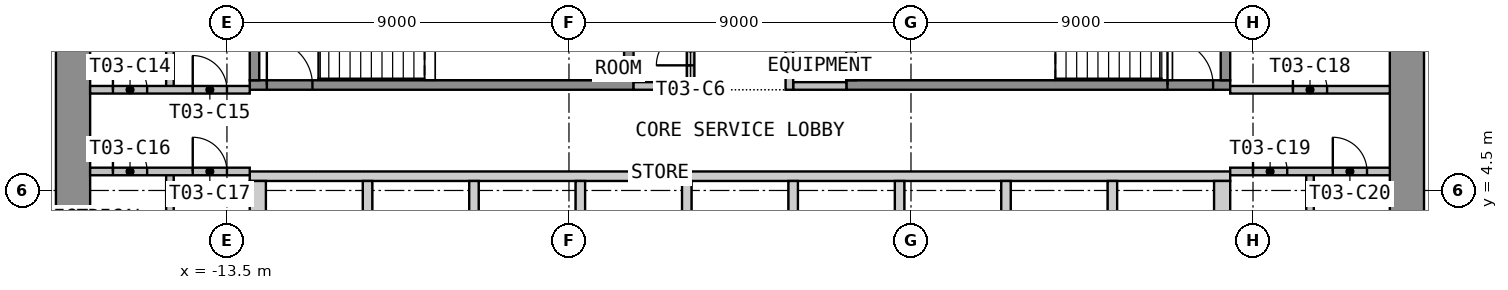
"""IFC4 building model, lengths in metres.
Left out: names, types, materials, properties, quantities, classifications, styles, units other than length and angle.
Written with IfcOpenShell. Run it as: python <this file> out.ifc"""

import sys

from ifc_helpers import new_model, si_unit, direction, frame, frame_2d, origin, place, context, subcontext, project, spatial, polyline, rectangle, outline, extrude, element, fill, save


model = new_model("IFC4")
c1 = context("Model", 3, precision=1e-05, world=origin(), true_north=direction((0.0, 1.0)))
c2 = subcontext(c1, "Body", "Model", "MODEL_VIEW")
j1 = project(units=[si_unit("LENGTHUNIT", "METRE"), si_unit("PLANEANGLEUNIT", "RADIAN")], contexts=[c1])
p1 = place(None, origin())
s1 = spatial("IfcSite", under=j1, at=p1, CompositionType="ELEMENT")
p2 = place(p1, origin())
s2 = spatial("IfcBuilding", under=s1, at=p2, CompositionType="ELEMENT")
p3 = place(p2, frame((0.0, 0.0, 53.4)))
s3 = spatial("IfcBuildingStorey", under=s2, at=p3, CompositionType="ELEMENT", Elevation=53.4)
p4 = place(p3, frame((-17.55, -12.6, 0.0), z_axis=(0.0, 0.0, 1.0), x_axis=(0.0, 1.0, 0.0)))
e1 = element("IfcWall", 1, at=p4, inside=s3, PredefinedType="SHEAR", context=c2, shape_type="SweptSolid", body=[
    extrude(rectangle(XDim=25.2, YDim=0.9, at=frame_2d((12.6, 0.0))), origin(), (0.0, 0.0, 1.0), 3.525),
])
p5 = place(p4, frame((11.4, 0.0, 0.0)))
e2 = element("IfcOpeningElement", 2, at=p5, cuts=e1, PredefinedType="OPENING", context=c2, shape_type="SweptSolid", body=[
    extrude(rectangle(XDim=2.4, YDim=2.1, at=frame_2d((1.2, 1.05))), frame((0.0, 0.46, 0.0), z_axis=(0.0, -1.0, 0.0), x_axis=(1.0, 0.0, 0.0)), (0.0, 0.0, 1.0), 0.92),
])
p6 = place(p3, frame((17.55, -12.6, 0.0), z_axis=(0.0, 0.0, 1.0), x_axis=(0.0, 1.0, 0.0)))
e3 = element("IfcWall", 3, at=p6, inside=s3, PredefinedType="SHEAR", context=c2, shape_type="SweptSolid", body=[
    extrude(rectangle(XDim=25.2, YDim=0.9, at=frame_2d((12.6, 0.0))), origin(), (0.0, 0.0, 1.0), 3.525),
])
p7 = place(p6, frame((11.4, 0.0, 0.0)))
e4 = element("IfcOpeningElement", 4, at=p7, cuts=e3, PredefinedType="OPENING", context=c2, shape_type="SweptSolid", body=[
    extrude(rectangle(XDim=2.4, YDim=2.1, at=frame_2d((1.2, 1.05))), frame((0.0, 0.46, 0.0), z_axis=(0.0, -1.0, 0.0), x_axis=(1.0, 0.0, 0.0)), (0.0, 0.0, 1.0), 0.92),
])
p8 = place(p3, origin())
e5 = element("IfcWall", 5, at=p8, inside=s3, PredefinedType="SHEAR", context=c2, shape_type="SweptSolid", body=[
    extrude(outline(polyline([(-12.9, 4.75), (12.9, 4.75), (12.9, 5.0), (-12.9, 5.0), (-12.9, 4.75)])), origin(), (0.0, 0.0, 1.0), 3.525),
])
p9 = place(p3, origin())
e6 = element("IfcWall", 6, at=p9, inside=s3, PredefinedType="SHEAR", context=c2, shape_type="SweptSolid", body=[
    extrude(outline(polyline([(-12.9, 2.05), (-12.475, 2.05), (-12.475, 4.75), (-12.9, 4.75), (-12.9, 2.05)])), origin(), (0.0, 0.0, 1.0), 3.525),
])
p10 = place(p3, origin())
e7 = element("IfcWall", 7, at=p10, inside=s3, PredefinedType="SHEAR", context=c2, shape_type="SweptSolid", body=[
    extrude(outline(polyline([(-9.925, 2.05), (-9.675, 2.05), (-9.675, 4.75), (-9.925, 4.75), (-9.925, 2.05)])), origin(), (0.0, 0.0, 1.0), 3.525),
])
p11 = place(p3, origin())
e8 = element("IfcWall", 8, at=p11, inside=s3, PredefinedType="SHEAR", context=c2, shape_type="SweptSolid", body=[
    extrude(outline(polyline([(-7.125, 2.05), (-6.875, 2.05), (-6.875, 4.75), (-7.125, 4.75), (-7.125, 2.05)])), origin(), (0.0, 0.0, 1.0), 3.525),
])
p12 = place(p3, origin())
e9 = element("IfcWall", 9, at=p12, inside=s3, PredefinedType="SHEAR", context=c2, shape_type="SweptSolid", body=[
    extrude(outline(polyline([(-4.325, 2.05), (-4.075, 2.05), (-4.075, 4.75), (-4.325, 4.75), (-4.325, 2.05)])), origin(), (0.0, 0.0, 1.0), 3.525),
])
p13 = place(p3, origin())
e10 = element("IfcWall", 10, at=p13, inside=s3, PredefinedType="SHEAR", context=c2, shape_type="SweptSolid", body=[
    extrude(outline(polyline([(-1.525, 2.05), (-1.275, 2.05), (-1.275, 4.75), (-1.525, 4.75), (-1.525, 2.05)])), origin(), (0.0, 0.0, 1.0), 3.525),
])
p14 = place(p3, origin())
e11 = element("IfcWall", 11, at=p14, inside=s3, PredefinedType="SHEAR", context=c2, shape_type="SweptSolid", body=[
    extrude(outline(polyline([(1.275, 2.05), (1.525, 2.05), (1.525, 4.75), (1.275, 4.75), (1.275, 2.05)])), origin(), (0.0, 0.0, 1.0), 3.525),
])
p15 = place(p3, origin())
e12 = element("IfcWall", 12, at=p15, inside=s3, PredefinedType="SHEAR", context=c2, shape_type="SweptSolid", body=[
    extrude(outline(polyline([(4.075, 2.05), (4.325, 2.05), (4.325, 4.75), (4.075, 4.75), (4.075, 2.05)])), origin(), (0.0, 0.0, 1.0), 3.525),
])
p16 = place(p3, origin())
e13 = element("IfcWall", 13, at=p16, inside=s3, PredefinedType="SHEAR", context=c2, shape_type="SweptSolid", body=[
    extrude(outline(polyline([(6.875, 2.05), (7.125, 2.05), (7.125, 4.75), (6.875, 4.75), (6.875, 2.05)])), origin(), (0.0, 0.0, 1.0), 3.525),
])
p17 = place(p3, origin())
e14 = element("IfcWall", 14, at=p17, inside=s3, PredefinedType="SHEAR", context=c2, shape_type="SweptSolid", body=[
    extrude(outline(polyline([(9.675, 2.05), (9.925, 2.05), (9.925, 4.75), (9.675, 4.75), (9.675, 2.05)])), origin(), (0.0, 0.0, 1.0), 3.525),
])
p18 = place(p3, origin())
e15 = element("IfcWall", 15, at=p18, inside=s3, PredefinedType="SHEAR", context=c2, shape_type="SweptSolid", body=[
    extrude(outline(polyline([(12.475, 2.05), (12.9, 2.05), (12.9, 4.75), (12.475, 4.75), (12.475, 2.05)])), origin(), (0.0, 0.0, 1.0), 3.525),
])
p19 = place(p3, frame((-12.9, 7.275, 0.0), z_axis=(0.0, 0.0, 1.0), x_axis=(1.0, 0.0, 0.0)))
e16 = element("IfcWall", 16, at=p19, inside=s3, PredefinedType="SHEAR", context=c2, shape_type="SweptSolid", body=[
    extrude(rectangle(XDim=10.1, YDim=0.25, at=frame_2d((5.05, 0.0))), origin(), (0.0, 0.0, 1.0), 3.525),
])
p20 = place(p19, frame((0.45, 0.0, 0.0)))
e17 = element("IfcOpeningElement", 17, at=p20, cuts=e16, PredefinedType="OPENING", context=c2, shape_type="SweptSolid", body=[
    extrude(rectangle(XDim=1.2, YDim=2.1, at=frame_2d((0.6, 1.05))), frame((0.0, 0.135, 0.0), z_axis=(0.0, -1.0, 0.0), x_axis=(1.0, 0.0, 0.0)), (0.0, 0.0, 1.0), 0.27),
])
for number, where, z_axis, x_axis in (
    (18, (-12.775, 7.4, 0.0), (0.0, 0.0, 1.0), (0.0, 1.0, 0.0)),
    (19, (-2.925, 7.4, 0.0), (0.0, 0.0, 1.0), (0.0, 1.0, 0.0)),
):
    element("IfcWall", number, at=place(p3, frame(where, z_axis=z_axis, x_axis=x_axis)), inside=s3, PredefinedType="SHEAR", context=c2, shape_type="SweptSolid", body=[
        extrude(rectangle(XDim=3.25, YDim=0.25, at=frame_2d((1.625, 0.0))), origin(), (0.0, 0.0, 1.0), 3.525),
    ])
p21 = place(p3, frame((2.8, 7.275, 0.0), z_axis=(0.0, 0.0, 1.0), x_axis=(1.0, 0.0, 0.0)))
e20 = element("IfcWall", 20, at=p21, inside=s3, PredefinedType="SHEAR", context=c2, shape_type="SweptSolid", body=[
    extrude(rectangle(XDim=10.1, YDim=0.25, at=frame_2d((5.05, 0.0))), origin(), (0.0, 0.0, 1.0), 3.525),
])
p22 = place(p21, frame((8.45, 0.0, 0.0)))
e21 = element("IfcOpeningElement", 21, at=p22, cuts=e20, PredefinedType="OPENING", context=c2, shape_type="SweptSolid", body=[
    extrude(rectangle(XDim=1.2, YDim=2.1, at=frame_2d((0.6, 1.05))), frame((0.0, 0.135, 0.0), z_axis=(0.0, -1.0, 0.0), x_axis=(1.0, 0.0, 0.0)), (0.0, 0.0, 1.0), 0.27),
])
for number, where, z_axis, x_axis in (
    (22, (2.925, 7.4, 0.0), (0.0, 0.0, 1.0), (0.0, 1.0, 0.0)),
    (23, (12.775, 7.4, 0.0), (0.0, 0.0, 1.0), (0.0, 1.0, 0.0)),
):
    element("IfcWall", number, at=place(p3, frame(where, z_axis=z_axis, x_axis=x_axis)), inside=s3, PredefinedType="SHEAR", context=c2, shape_type="SweptSolid", body=[
        extrude(rectangle(XDim=3.25, YDim=0.25, at=frame_2d((1.625, 0.0))), origin(), (0.0, 0.0, 1.0), 3.525),
    ])
for number, where, z_axis, x_axis in (
    (24, (-2.8, 7.25, 0.0), (0.0, 0.0, 1.0), (1.0, 0.0, 0.0)),
    (25, (1.4, 7.25, 0.0), (0.0, 0.0, 1.0), (1.0, 0.0, 0.0)),
):
    element("IfcWall", number, at=place(p3, frame(where, z_axis=z_axis, x_axis=x_axis)), inside=s3, PredefinedType="PARTITIONING", context=c2, shape_type="SweptSolid", body=[
        extrude(rectangle(XDim=1.4, YDim=0.2, at=frame_2d((0.7, 0.0))), origin(), (0.0, 0.0, 1.0), 3.525),
    ])
p23 = place(p3, frame((-1.3, 7.15, 0.0), z_axis=(0.0, 0.0, 1.0), x_axis=(0.0, 1.0, 0.0)))
e26 = element("IfcWall", 26, at=p23, inside=s3, PredefinedType="PARTITIONING", context=c2, shape_type="SweptSolid", body=[
    extrude(rectangle(XDim=5.45, YDim=0.2, at=frame_2d((2.725, 0.0))), origin(), (0.0, 0.0, 1.0), 3.525),
])
p24 = place(p23, frame((0.643, 0.0, 0.0)))
e27 = element("IfcOpeningElement", 27, at=p24, cuts=e26, PredefinedType="OPENING", context=c2, shape_type="SweptSolid", body=[
    extrude(rectangle(XDim=0.9, YDim=2.1, at=frame_2d((0.45, 1.05))), frame((0.0, 0.11, 0.0), z_axis=(0.0, -1.0, 0.0), x_axis=(1.0, 0.0, 0.0)), (0.0, 0.0, 1.0), 0.22),
])
p25 = place(p23, frame((2.401, 0.0, 0.0)))
e28 = element("IfcOpeningElement", 28, at=p25, cuts=e26, PredefinedType="OPENING", context=c2, shape_type="SweptSolid", body=[
    extrude(rectangle(XDim=0.9, YDim=2.1, at=frame_2d((0.45, 1.05))), frame((0.0, 0.11, 0.0), z_axis=(0.0, -1.0, 0.0), x_axis=(1.0, 0.0, 0.0)), (0.0, 0.0, 1.0), 0.22),
])
p26 = place(p23, frame((4.134, 0.0, 0.0)))
e29 = element("IfcOpeningElement", 29, at=p26, cuts=e26, PredefinedType="OPENING", context=c2, shape_type="SweptSolid", body=[
    extrude(rectangle(XDim=0.9, YDim=2.1, at=frame_2d((0.45, 1.05))), frame((0.0, 0.11, 0.0), z_axis=(0.0, -1.0, 0.0), x_axis=(1.0, 0.0, 0.0)), (0.0, 0.0, 1.0), 0.22),
])
p27 = place(p3, frame((1.3, 7.15, 0.0), z_axis=(0.0, 0.0, 1.0), x_axis=(0.0, 1.0, 0.0)))
e30 = element("IfcWall", 30, at=p27, inside=s3, PredefinedType="PARTITIONING", context=c2, shape_type="SweptSolid", body=[
    extrude(rectangle(XDim=5.45, YDim=0.2, at=frame_2d((2.725, 0.0))), origin(), (0.0, 0.0, 1.0), 3.525),
])
p28 = place(p27, frame((2.375, 0.0, 0.0)))
e31 = element("IfcOpeningElement", 31, at=p28, cuts=e30, PredefinedType="OPENING", context=c2, shape_type="SweptSolid", body=[
    extrude(rectangle(XDim=0.9, YDim=2.1, at=frame_2d((0.45, 1.05))), frame((0.0, 0.11, 0.0), z_axis=(0.0, -1.0, 0.0), x_axis=(1.0, 0.0, 0.0)), (0.0, 0.0, 1.0), 0.22),
])
p29 = place(p3, frame((-15.0, 7.15, 0.0), z_axis=(0.0, 0.0, 1.0), x_axis=(0.0, 1.0, 0.0)))
e32 = element("IfcWall", 32, at=p29, inside=s3, PredefinedType="PARTITIONING", context=c2, shape_type="SweptSolid", body=[
    extrude(rectangle(XDim=5.45, YDim=0.2, at=frame_2d((2.725, 0.0))), origin(), (0.0, 0.0, 1.0), 3.525),
])
p30 = place(p3, frame((-17.1, 7.15, 0.0), z_axis=(0.0, 0.0, 1.0), x_axis=(1.0, 0.0, 0.0)))
e33 = element("IfcWall", 33, at=p30, inside=s3, PredefinedType="PARTITIONING", context=c2, shape_type="SweptSolid", body=[
    extrude(rectangle(XDim=4.2, YDim=0.2, at=frame_2d((2.1, 0.0))), origin(), (0.0, 0.0, 1.0), 3.525),
])
p31 = place(p30, frame((0.6, 0.0, 0.0)))
e34 = element("IfcOpeningElement", 34, at=p31, cuts=e33, PredefinedType="OPENING", context=c2, shape_type="SweptSolid", body=[
    extrude(rectangle(XDim=0.9, YDim=2.1, at=frame_2d((0.45, 1.05))), frame((0.0, 0.11, 0.0), z_axis=(0.0, -1.0, 0.0), x_axis=(1.0, 0.0, 0.0)), (0.0, 0.0, 1.0), 0.22),
])
p32 = place(p30, frame((2.7, 0.0, 0.0)))
e35 = element("IfcOpeningElement", 35, at=p32, cuts=e33, PredefinedType="OPENING", context=c2, shape_type="SweptSolid", body=[
    extrude(rectangle(XDim=0.9, YDim=2.1, at=frame_2d((0.45, 1.05))), frame((0.0, 0.11, 0.0), z_axis=(0.0, -1.0, 0.0), x_axis=(1.0, 0.0, 0.0)), (0.0, 0.0, 1.0), 0.22),
])
p33 = place(p3, frame((-15.0, 1.8, 0.0), z_axis=(0.0, 0.0, 1.0), x_axis=(0.0, 1.0, 0.0)))
e36 = element("IfcWall", 36, at=p33, inside=s3, PredefinedType="PARTITIONING", context=c2, shape_type="SweptSolid", body=[
    extrude(rectangle(XDim=3.2, YDim=0.2, at=frame_2d((1.6, 0.0))), origin(), (0.0, 0.0, 1.0), 3.525),
])
p34 = place(p3, frame((-17.1, 5.0, 0.0), z_axis=(0.0, 0.0, 1.0), x_axis=(1.0, 0.0, 0.0)))
e37 = element("IfcWall", 37, at=p34, inside=s3, PredefinedType="PARTITIONING", context=c2, shape_type="SweptSolid", body=[
    extrude(rectangle(XDim=4.2, YDim=0.2, at=frame_2d((2.1, 0.0))), origin(), (0.0, 0.0, 1.0), 3.525),
])
p35 = place(p34, frame((0.6, 0.0, 0.0)))
e38 = element("IfcOpeningElement", 38, at=p35, cuts=e37, PredefinedType="OPENING", context=c2, shape_type="SweptSolid", body=[
    extrude(rectangle(XDim=0.9, YDim=2.1, at=frame_2d((0.45, 1.05))), frame((0.0, 0.11, 0.0), z_axis=(0.0, -1.0, 0.0), x_axis=(1.0, 0.0, 0.0)), (0.0, 0.0, 1.0), 0.22),
])
p36 = place(p34, frame((2.7, 0.0, 0.0)))
e39 = element("IfcOpeningElement", 39, at=p36, cuts=e37, PredefinedType="OPENING", context=c2, shape_type="SweptSolid", body=[
    extrude(rectangle(XDim=0.9, YDim=2.1, at=frame_2d((0.45, 1.05))), frame((0.0, 0.11, 0.0), z_axis=(0.0, -1.0, 0.0), x_axis=(1.0, 0.0, 0.0)), (0.0, 0.0, 1.0), 0.22),
])
p37 = place(p3, frame((12.9, 7.15, 0.0), z_axis=(0.0, 0.0, 1.0), x_axis=(1.0, 0.0, 0.0)))
e40 = element("IfcWall", 40, at=p37, inside=s3, PredefinedType="PARTITIONING", context=c2, shape_type="SweptSolid", body=[
    extrude(rectangle(XDim=4.2, YDim=0.2, at=frame_2d((2.1, 0.0))), origin(), (0.0, 0.0, 1.0), 3.525),
])
p38 = place(p37, frame((1.65, 0.0, 0.0)))
e41 = element("IfcOpeningElement", 41, at=p38, cuts=e40, PredefinedType="OPENING", context=c2, shape_type="SweptSolid", body=[
    extrude(rectangle(XDim=0.9, YDim=2.1, at=frame_2d((0.45, 1.05))), frame((0.0, 0.11, 0.0), z_axis=(0.0, -1.0, 0.0), x_axis=(1.0, 0.0, 0.0)), (0.0, 0.0, 1.0), 0.22),
])
p39 = place(p3, frame((15.0, 1.8, 0.0), z_axis=(0.0, 0.0, 1.0), x_axis=(0.0, 1.0, 0.0)))
e42 = element("IfcWall", 42, at=p39, inside=s3, PredefinedType="PARTITIONING", context=c2, shape_type="SweptSolid", body=[
    extrude(rectangle(XDim=3.2, YDim=0.2, at=frame_2d((1.6, 0.0))), origin(), (0.0, 0.0, 1.0), 3.525),
])
p40 = place(p3, frame((12.9, 5.0, 0.0), z_axis=(0.0, 0.0, 1.0), x_axis=(1.0, 0.0, 0.0)))
e43 = element("IfcWall", 43, at=p40, inside=s3, PredefinedType="PARTITIONING", context=c2, shape_type="SweptSolid", body=[
    extrude(rectangle(XDim=4.2, YDim=0.2, at=frame_2d((2.1, 0.0))), origin(), (0.0, 0.0, 1.0), 3.525),
])
p41 = place(p40, frame((0.6, 0.0, 0.0)))
e44 = element("IfcOpeningElement", 44, at=p41, cuts=e43, PredefinedType="OPENING", context=c2, shape_type="SweptSolid", body=[
    extrude(rectangle(XDim=0.9, YDim=2.1, at=frame_2d((0.45, 1.05))), frame((0.0, 0.11, 0.0), z_axis=(0.0, -1.0, 0.0), x_axis=(1.0, 0.0, 0.0)), (0.0, 0.0, 1.0), 0.22),
])
p42 = place(p40, frame((2.7, 0.0, 0.0)))
e45 = element("IfcOpeningElement", 45, at=p42, cuts=e43, PredefinedType="OPENING", context=c2, shape_type="SweptSolid", body=[
    extrude(rectangle(XDim=0.9, YDim=2.1, at=frame_2d((0.45, 1.05))), frame((0.0, 0.11, 0.0), z_axis=(0.0, -1.0, 0.0), x_axis=(1.0, 0.0, 0.0)), (0.0, 0.0, 1.0), 0.22),
])
p43 = place(p20, origin())
e46 = element("IfcDoor", 46, at=p43, inside=s3, OperationType="SINGLE_SWING_LEFT", PredefinedType="DOOR", context=c2, shape_type="SweptSolid", body=[
    extrude(rectangle(XDim=1.2, YDim=2.1, at=frame_2d((0.6, 1.05))), frame((0.0, 0.025, 0.0), z_axis=(0.0, -1.0, 0.0), x_axis=(1.0, 0.0, 0.0)), (0.0, 0.0, 1.0), 0.05),
])
fill(e17, e46)
p44 = place(p22, origin())
e47 = element("IfcDoor", 47, at=p44, inside=s3, OperationType="SINGLE_SWING_LEFT", PredefinedType="DOOR", context=c2, shape_type="SweptSolid", body=[
    extrude(rectangle(XDim=1.2, YDim=2.1, at=frame_2d((0.6, 1.05))), frame((0.0, 0.025, 0.0), z_axis=(0.0, -1.0, 0.0), x_axis=(1.0, 0.0, 0.0)), (0.0, 0.0, 1.0), 0.05),
])
fill(e21, e47)
p45 = place(p24, origin())
e48 = element("IfcDoor", 48, at=p45, inside=s3, OperationType="SINGLE_SWING_LEFT", PredefinedType="DOOR", context=c2, shape_type="SweptSolid", body=[
    extrude(rectangle(XDim=0.9, YDim=2.1, at=frame_2d((0.45, 1.05))), frame((0.0, 0.025, 0.0), z_axis=(0.0, -1.0, 0.0), x_axis=(1.0, 0.0, 0.0)), (0.0, 0.0, 1.0), 0.05),
])
fill(e27, e48)
p46 = place(p31, origin())
e49 = element("IfcDoor", 49, at=p46, inside=s3, OperationType="SINGLE_SWING_LEFT", PredefinedType="DOOR", context=c2, shape_type="SweptSolid", body=[
    extrude(rectangle(XDim=0.9, YDim=2.1, at=frame_2d((0.45, 1.05))), frame((0.0, 0.025, 0.0), z_axis=(0.0, -1.0, 0.0), x_axis=(1.0, 0.0, 0.0)), (0.0, 0.0, 1.0), 0.05),
])
fill(e34, e49)
p47 = place(p32, origin())
e50 = element("IfcDoor", 50, at=p47, inside=s3, OperationType="SINGLE_SWING_LEFT", PredefinedType="DOOR", context=c2, shape_type="SweptSolid", body=[
    extrude(rectangle(XDim=0.9, YDim=2.1, at=frame_2d((0.45, 1.05))), frame((0.0, 0.025, 0.0), z_axis=(0.0, -1.0, 0.0), x_axis=(1.0, 0.0, 0.0)), (0.0, 0.0, 1.0), 0.05),
])
fill(e35, e50)
p48 = place(p35, origin())
e51 = element("IfcDoor", 51, at=p48, inside=s3, OperationType="SINGLE_SWING_LEFT", PredefinedType="DOOR", context=c2, shape_type="SweptSolid", body=[
    extrude(rectangle(XDim=0.9, YDim=2.1, at=frame_2d((0.45, 1.05))), frame((0.0, 0.025, 0.0), z_axis=(0.0, -1.0, 0.0), x_axis=(1.0, 0.0, 0.0)), (0.0, 0.0, 1.0), 0.05),
])
fill(e38, e51)
p49 = place(p36, origin())
e52 = element("IfcDoor", 52, at=p49, inside=s3, OperationType="SINGLE_SWING_LEFT", PredefinedType="DOOR", context=c2, shape_type="SweptSolid", body=[
    extrude(rectangle(XDim=0.9, YDim=2.1, at=frame_2d((0.45, 1.05))), frame((0.0, 0.025, 0.0), z_axis=(0.0, -1.0, 0.0), x_axis=(1.0, 0.0, 0.0)), (0.0, 0.0, 1.0), 0.05),
])
fill(e39, e52)
p50 = place(p38, origin())
e53 = element("IfcDoor", 53, at=p50, inside=s3, OperationType="SINGLE_SWING_LEFT", PredefinedType="DOOR", context=c2, shape_type="SweptSolid", body=[
    extrude(rectangle(XDim=0.9, YDim=2.1, at=frame_2d((0.45, 1.05))), frame((0.0, 0.025, 0.0), z_axis=(0.0, -1.0, 0.0), x_axis=(1.0, 0.0, 0.0)), (0.0, 0.0, 1.0), 0.05),
])
fill(e41, e53)
p51 = place(p41, origin())
e54 = element("IfcDoor", 54, at=p51, inside=s3, OperationType="SINGLE_SWING_LEFT", PredefinedType="DOOR", context=c2, shape_type="SweptSolid", body=[
    extrude(rectangle(XDim=0.9, YDim=2.1, at=frame_2d((0.45, 1.05))), frame((0.0, 0.025, 0.0), z_axis=(0.0, -1.0, 0.0), x_axis=(1.0, 0.0, 0.0)), (0.0, 0.0, 1.0), 0.05),
])
fill(e44, e54)
p52 = place(p42, origin())
e55 = element("IfcDoor", 55, at=p52, inside=s3, OperationType="SINGLE_SWING_LEFT", PredefinedType="DOOR", context=c2, shape_type="SweptSolid", body=[
    extrude(rectangle(XDim=0.9, YDim=2.1, at=frame_2d((0.45, 1.05))), frame((0.0, 0.025, 0.0), z_axis=(0.0, -1.0, 0.0), x_axis=(1.0, 0.0, 0.0)), (0.0, 0.0, 1.0), 0.05),
])
fill(e45, e55)
save(model, sys.argv[1])
